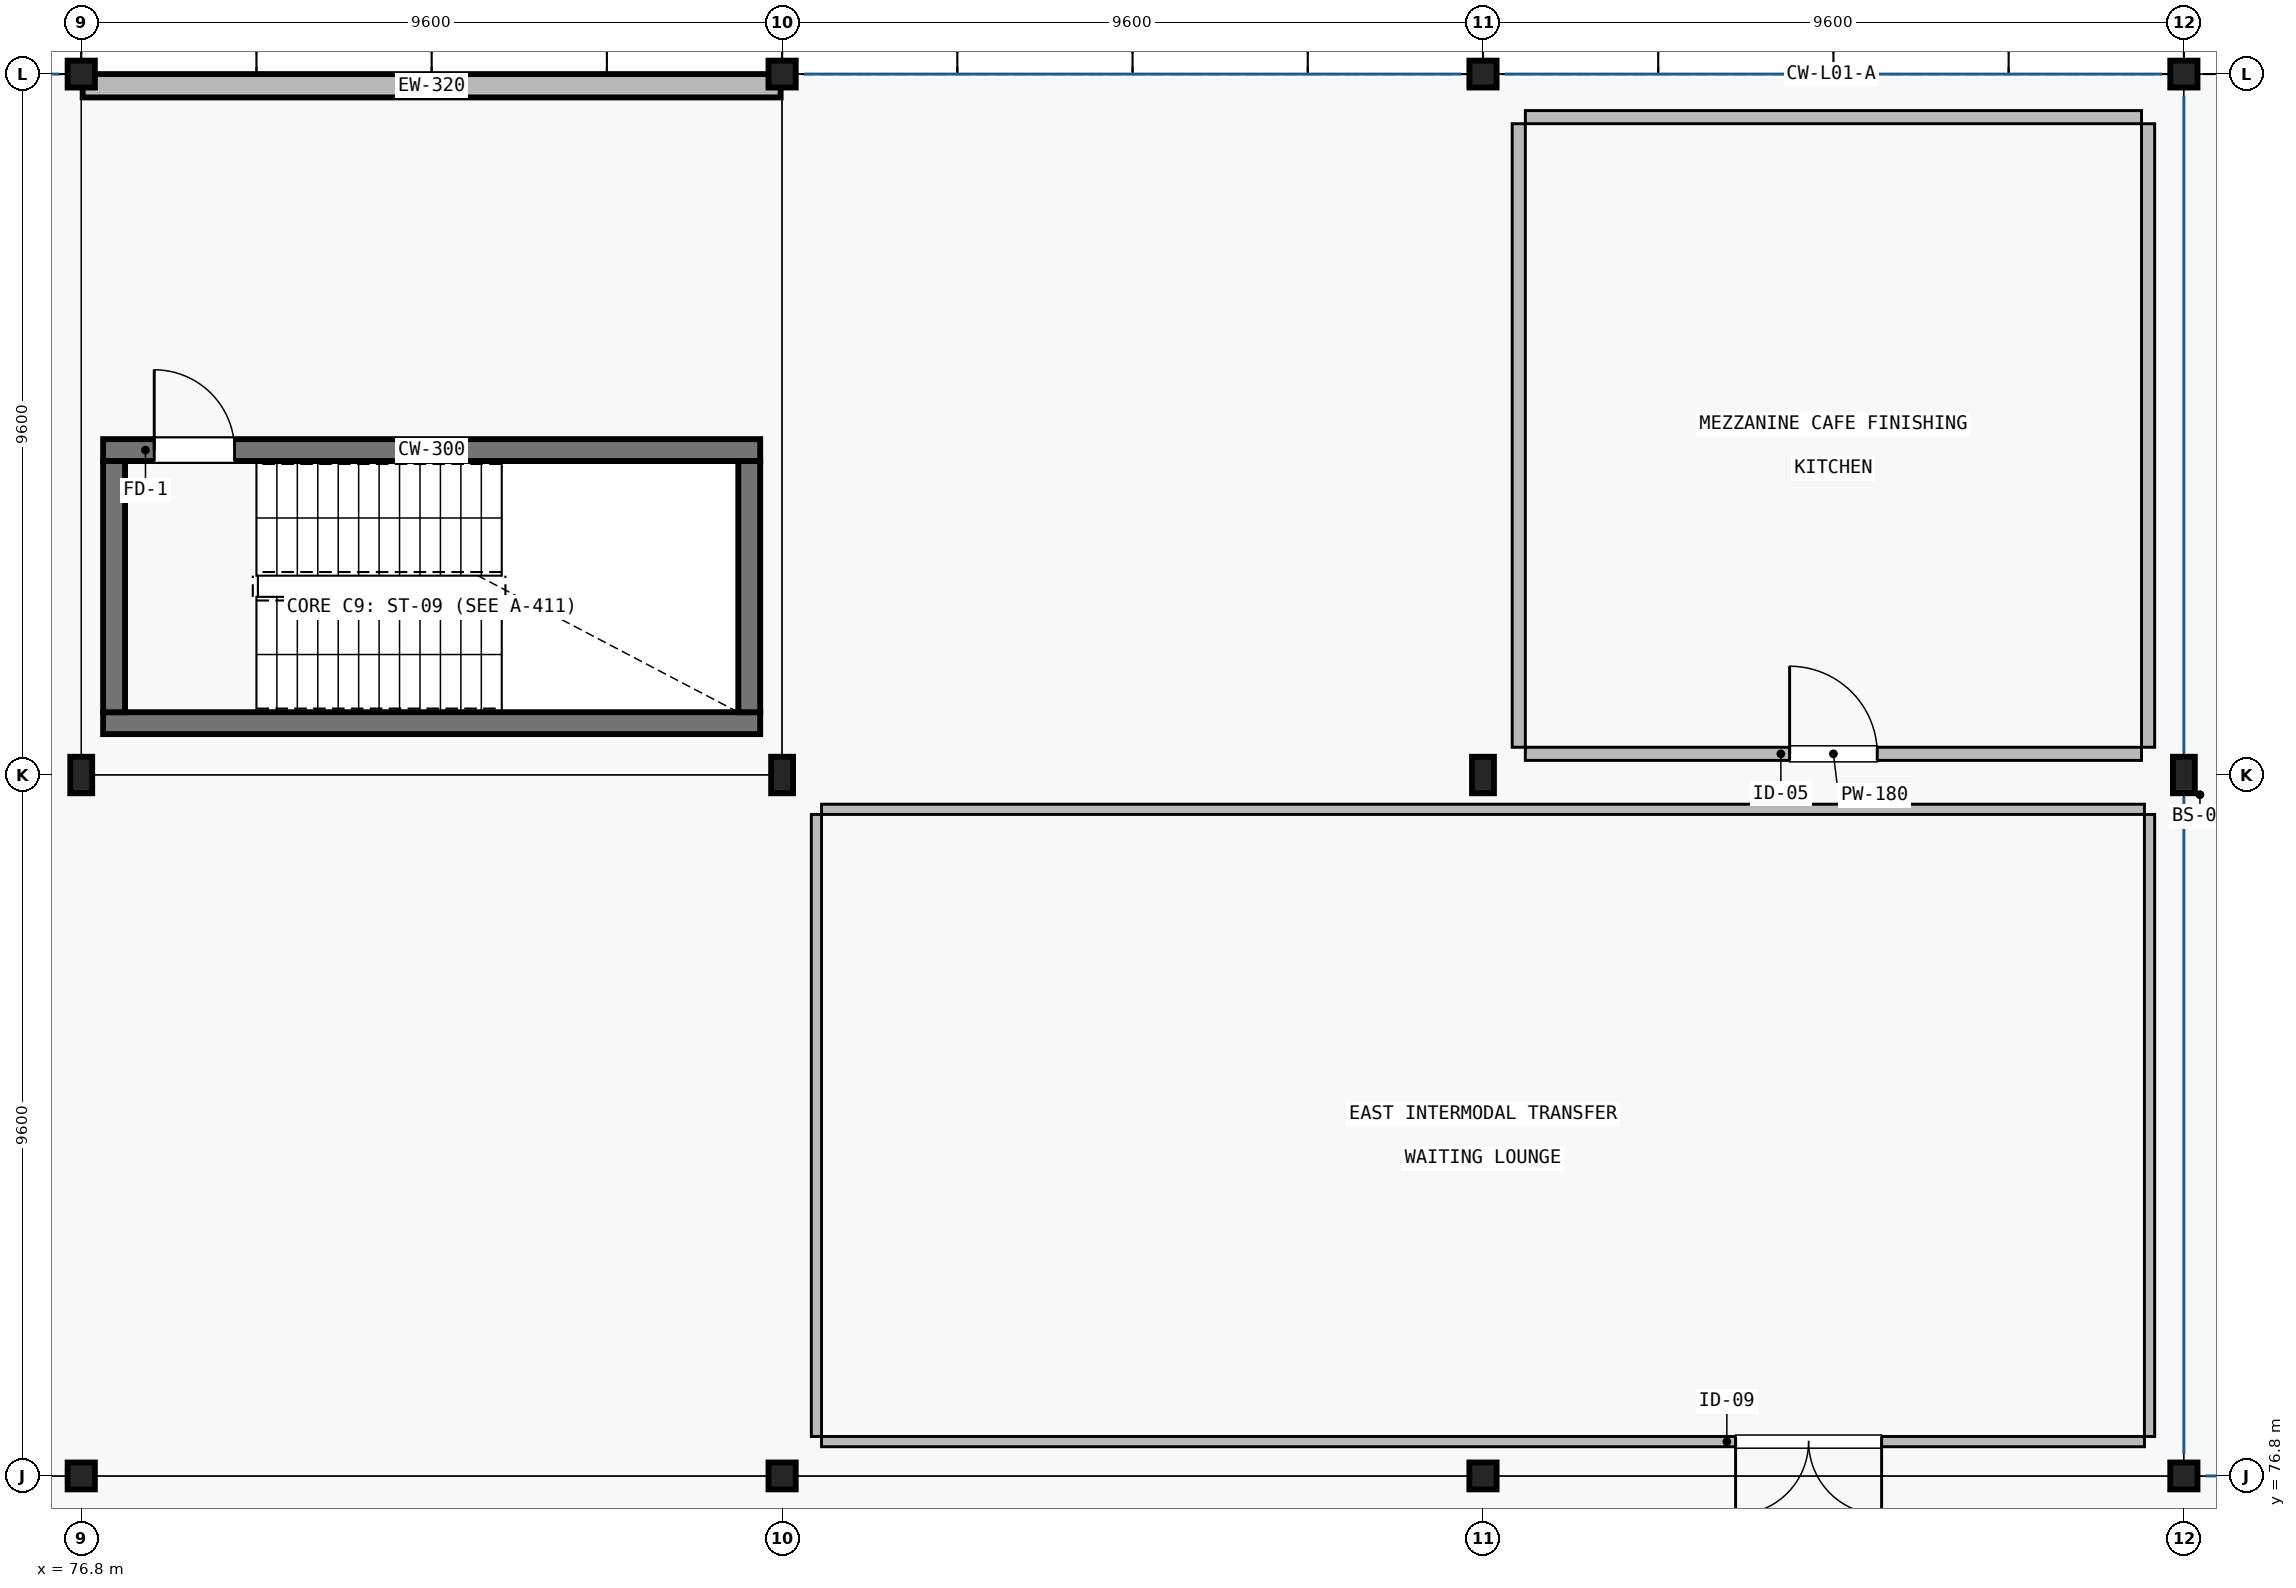
"""IFC4 building model, lengths in metres.
Left out: names, types, materials, properties, quantities, classifications, styles, units other than length and angle.
Written with IfcOpenShell. Run it as: python <this file> out.ifc"""

import sys

from ifc_helpers import new_model, si_unit, direction, frame, frame_2d, origin, origin_2d, place, context, subcontext, project, spatial, rectangle, i_section, extrude, element, fill, save


model = new_model("IFC4")
c1 = context("Model", 3, precision=1e-05, world=origin(), true_north=direction((0.0, 1.0)))
c2 = subcontext(c1, "Body", "Model", "MODEL_VIEW")
j1 = project(units=[si_unit("LENGTHUNIT", "METRE"), si_unit("PLANEANGLEUNIT", "RADIAN")], contexts=[c1])
p1 = place(None, origin())
s1 = spatial("IfcSite", under=j1, at=p1, CompositionType="ELEMENT")
p2 = place(p1, origin())
s2 = spatial("IfcBuilding", under=s1, at=p2, CompositionType="ELEMENT")
p3 = place(p2, frame((0.0, 0.0, 6.0)))
s3 = spatial("IfcBuildingStorey", under=s2, at=p3, CompositionType="ELEMENT", Elevation=6.0)
p4 = place(p3, frame((76.8, 76.8, 0.0), z_axis=(0.0, 0.0, 1.0), x_axis=(1.0, 0.0, 0.0)))
e1 = element("IfcColumn", 1, at=p4, inside=s3, PredefinedType="COLUMN", context=c2, shape_type="SweptSolid", body=[
    extrude(i_section(OverallWidth=0.373, OverallDepth=0.368, WebThickness=0.014, FlangeThickness=0.024, FilletRadius=0.015, at=origin_2d()), origin(), (0.0, 0.0, 1.0), 4.25),
])
p5 = place(p3, frame((76.8, 86.4, 0.0), z_axis=(0.0, 0.0, 1.0), x_axis=(1.0, 0.0, 0.0)))
e2 = element("IfcColumn", 2, at=p5, inside=s3, PredefinedType="COLUMN", context=c2, shape_type="SweptSolid", body=[
    extrude(i_section(OverallWidth=0.3, OverallDepth=0.5, WebThickness=0.014, FlangeThickness=0.028, FilletRadius=0.027, at=origin_2d()), origin(), (0.0, 0.0, 1.0), 4.25),
])
for number, where, z_axis, x_axis in (
    (3, (76.8, 96.0, 0.0), (0.0, 0.0, 1.0), (1.0, 0.0, 0.0)),
    (4, (86.4, 76.8, 0.0), (0.0, 0.0, 1.0), (1.0, 0.0, 0.0)),
):
    element("IfcColumn", number, at=place(p3, frame(where, z_axis=z_axis, x_axis=x_axis)), inside=s3, PredefinedType="COLUMN", context=c2, shape_type="SweptSolid", body=[
        extrude(i_section(OverallWidth=0.373, OverallDepth=0.368, WebThickness=0.014, FlangeThickness=0.024, FilletRadius=0.015, at=origin_2d()), origin(), (0.0, 0.0, 1.0), 4.25),
    ])
p6 = place(p3, frame((86.4, 86.4, 0.0), z_axis=(0.0, 0.0, 1.0), x_axis=(1.0, 0.0, 0.0)))
e5 = element("IfcColumn", 5, at=p6, inside=s3, PredefinedType="COLUMN", context=c2, shape_type="SweptSolid", body=[
    extrude(i_section(OverallWidth=0.3, OverallDepth=0.5, WebThickness=0.014, FlangeThickness=0.028, FilletRadius=0.027, at=origin_2d()), origin(), (0.0, 0.0, 1.0), 4.25),
])
for number, where, z_axis, x_axis in (
    (6, (86.4, 96.0, 0.0), (0.0, 0.0, 1.0), (1.0, 0.0, 0.0)),
    (7, (96.0, 76.8, 0.0), (0.0, 0.0, 1.0), (1.0, 0.0, 0.0)),
):
    element("IfcColumn", number, at=place(p3, frame(where, z_axis=z_axis, x_axis=x_axis)), inside=s3, PredefinedType="COLUMN", context=c2, shape_type="SweptSolid", body=[
        extrude(i_section(OverallWidth=0.373, OverallDepth=0.368, WebThickness=0.014, FlangeThickness=0.024, FilletRadius=0.015, at=origin_2d()), origin(), (0.0, 0.0, 1.0), 4.25),
    ])
p7 = place(p3, frame((96.0, 86.4, 0.0), z_axis=(0.0, 0.0, 1.0), x_axis=(1.0, 0.0, 0.0)))
e8 = element("IfcColumn", 8, at=p7, inside=s3, PredefinedType="COLUMN", context=c2, shape_type="SweptSolid", body=[
    extrude(i_section(OverallWidth=0.3, OverallDepth=0.5, WebThickness=0.014, FlangeThickness=0.028, FilletRadius=0.027, at=origin_2d()), origin(), (0.0, 0.0, 1.0), 4.25),
])
p8 = place(p3, frame((96.0, 96.0, 0.0), z_axis=(0.0, 0.0, 1.0), x_axis=(1.0, 0.0, 0.0)))
e9 = element("IfcColumn", 9, at=p8, inside=s3, PredefinedType="COLUMN", context=c2, shape_type="SweptSolid", body=[
    extrude(i_section(OverallWidth=0.373, OverallDepth=0.368, WebThickness=0.014, FlangeThickness=0.024, FilletRadius=0.015, at=origin_2d()), origin(), (0.0, 0.0, 1.0), 4.25),
])
p9 = place(p3, frame((105.6, 76.8, 0.0), z_axis=(0.0, 0.0, 1.0), x_axis=(1.0, 0.0, 0.0)))
e10 = element("IfcColumn", 10, at=p9, inside=s3, PredefinedType="COLUMN", context=c2, shape_type="SweptSolid", body=[
    extrude(i_section(OverallWidth=0.373, OverallDepth=0.368, WebThickness=0.014, FlangeThickness=0.024, FilletRadius=0.015, at=origin_2d()), origin(), (0.0, 0.0, 1.0), 4.55),
])
p10 = place(p3, frame((105.6, 86.4, 0.0), z_axis=(0.0, 0.0, 1.0), x_axis=(1.0, 0.0, 0.0)))
e11 = element("IfcColumn", 11, at=p10, inside=s3, PredefinedType="COLUMN", context=c2, shape_type="SweptSolid", body=[
    extrude(i_section(OverallWidth=0.3, OverallDepth=0.5, WebThickness=0.014, FlangeThickness=0.028, FilletRadius=0.027, at=origin_2d()), origin(), (0.0, 0.0, 1.0), 4.25),
])
p11 = place(p3, frame((105.6, 96.0, 0.0), z_axis=(0.0, 0.0, 1.0), x_axis=(1.0, 0.0, 0.0)))
e12 = element("IfcColumn", 12, at=p11, inside=s3, PredefinedType="COLUMN", context=c2, shape_type="SweptSolid", body=[
    extrude(i_section(OverallWidth=0.373, OverallDepth=0.368, WebThickness=0.014, FlangeThickness=0.024, FilletRadius=0.015, at=origin_2d()), origin(), (0.0, 0.0, 1.0), 4.25),
])
p12 = place(p3, frame((77.1, 87.11, 0.0), z_axis=(0.0, 0.0, 1.0), x_axis=(1.0, 0.0, 0.0)))
e13 = element("IfcWall", 13, at=p12, inside=s3, PredefinedType="SHEAR", context=c2, shape_type="SweptSolid", body=[
    extrude(rectangle(XDim=9.0, YDim=0.3, at=frame_2d((4.5, 0.0))), origin(), (0.0, 0.0, 1.0), 4.25),
])
p13 = place(p3, frame((86.1, 90.85, 0.0), z_axis=(0.0, 0.0, 1.0), x_axis=(-1.0, 0.0, 0.0)))
e14 = element("IfcWall", 14, at=p13, inside=s3, PredefinedType="SHEAR", context=c2, shape_type="SweptSolid", body=[
    extrude(rectangle(XDim=9.0, YDim=0.3, at=frame_2d((4.5, 0.0))), origin(), (0.0, 0.0, 1.0), 4.25),
])
p14 = place(p13, frame((7.2, 0.0, 0.0)))
e15 = element("IfcOpeningElement", 15, at=p14, cuts=e14, PredefinedType="OPENING", context=c2, shape_type="SweptSolid", body=[
    extrude(rectangle(XDim=1.1, YDim=2.15, at=frame_2d((0.55, 1.075))), frame((0.0, 0.16, 0.0), z_axis=(0.0, -1.0, 0.0), x_axis=(1.0, 0.0, 0.0)), (0.0, 0.0, 1.0), 0.32),
])
for number, where, z_axis, x_axis in (
    (16, (77.25, 87.26, 0.0), (0.0, 0.0, 1.0), (0.0, 1.0, 0.0)),
    (17, (85.95, 90.7, 0.0), (0.0, 0.0, 1.0), (0.0, -1.0, 0.0)),
):
    element("IfcWall", number, at=place(p3, frame(where, z_axis=z_axis, x_axis=x_axis)), inside=s3, PredefinedType="SHEAR", context=c2, shape_type="SweptSolid", body=[
        extrude(rectangle(XDim=3.44, YDim=0.3, at=frame_2d((1.72, 0.0))), origin(), (0.0, 0.0, 1.0), 4.25),
    ])
p15 = place(p3, frame((76.82, 95.84, 0.0), z_axis=(0.0, 0.0, 1.0), x_axis=(1.0, 0.0, 0.0)))
e18 = element("IfcWall", 18, at=p15, inside=s3, PredefinedType="SOLIDWALL", context=c2, shape_type="SweptSolid", body=[
    extrude(rectangle(XDim=9.56, YDim=0.32, at=frame_2d((4.78, 0.0))), origin(), (0.0, 0.0, 1.0), 3.9),
])
p16 = place(p3, frame((105.06, 77.27, 0.0), z_axis=(0.0, 0.0, 1.0), x_axis=(-1.0, 0.0, 0.0)))
e19 = element("IfcWall", 19, at=p16, inside=s3, PredefinedType="PARTITIONING", context=c2, shape_type="SweptSolid", body=[
    extrude(rectangle(XDim=18.12, YDim=0.14, at=frame_2d((9.06, 0.0))), origin(), (0.0, 0.0, 1.0), 3.707),
])
p17 = place(p16, frame((3.6, 0.0, 0.0)))
e20 = element("IfcOpeningElement", 20, at=p17, cuts=e19, PredefinedType="OPENING", context=c2, shape_type="SweptSolid", body=[
    extrude(rectangle(XDim=2.0, YDim=2.4, at=frame_2d((1.0, 1.2))), frame((0.0, 0.08, 0.0), z_axis=(0.0, -1.0, 0.0), x_axis=(1.0, 0.0, 0.0)), (0.0, 0.0, 1.0), 0.16),
])
p18 = place(p3, frame((86.94, 85.93, 0.0), z_axis=(0.0, 0.0, 1.0), x_axis=(1.0, 0.0, 0.0)))
e21 = element("IfcWall", 21, at=p18, inside=s3, PredefinedType="PARTITIONING", context=c2, shape_type="SweptSolid", body=[
    extrude(rectangle(XDim=18.12, YDim=0.14, at=frame_2d((9.06, 0.0))), origin(), (0.0, 0.0, 1.0), 3.707),
])
for number, where, z_axis, x_axis in (
    (22, (86.87, 77.34, 0.0), (0.0, 0.0, 1.0), (0.0, 1.0, 0.0)),
    (23, (105.13, 85.86, 0.0), (0.0, 0.0, 1.0), (0.0, -1.0, 0.0)),
):
    element("IfcWall", number, at=place(p3, frame(where, z_axis=z_axis, x_axis=x_axis)), inside=s3, PredefinedType="PARTITIONING", context=c2, shape_type="SweptSolid", body=[
        extrude(rectangle(XDim=8.52, YDim=0.14, at=frame_2d((4.26, 0.0))), origin(), (0.0, 0.0, 1.0), 3.89),
    ])
p19 = place(p3, frame((105.02, 86.69, 0.0), z_axis=(0.0, 0.0, 1.0), x_axis=(-1.0, 0.0, 0.0)))
e24 = element("IfcWall", 24, at=p19, inside=s3, PredefinedType="PARTITIONING", context=c2, shape_type="SweptSolid", body=[
    extrude(rectangle(XDim=8.44, YDim=0.18, at=frame_2d((4.22, 0.0))), origin(), (0.0, 0.0, 1.0), 3.89),
])
p20 = place(p19, frame((3.62, 0.0, 0.0)))
e25 = element("IfcOpeningElement", 25, at=p20, cuts=e24, PredefinedType="OPENING", context=c2, shape_type="SweptSolid", body=[
    extrude(rectangle(XDim=1.2, YDim=2.2, at=frame_2d((0.6, 1.1))), frame((0.0, 0.1, 0.0), z_axis=(0.0, -1.0, 0.0), x_axis=(1.0, 0.0, 0.0)), (0.0, 0.0, 1.0), 0.2),
])
p21 = place(p3, frame((96.58, 95.41, 0.0), z_axis=(0.0, 0.0, 1.0), x_axis=(1.0, 0.0, 0.0)))
e26 = element("IfcWall", 26, at=p21, inside=s3, PredefinedType="PARTITIONING", context=c2, shape_type="SweptSolid", body=[
    extrude(rectangle(XDim=8.44, YDim=0.18, at=frame_2d((4.22, 0.0))), origin(), (0.0, 0.0, 1.0), 3.89),
])
for number, where, z_axis, x_axis in (
    (27, (96.49, 86.78, 0.0), (0.0, 0.0, 1.0), (0.0, 1.0, 0.0)),
    (28, (105.11, 95.32, 0.0), (0.0, 0.0, 1.0), (0.0, -1.0, 0.0)),
):
    element("IfcWall", number, at=place(p3, frame(where, z_axis=z_axis, x_axis=x_axis)), inside=s3, PredefinedType="PARTITIONING", context=c2, shape_type="SweptSolid", body=[
        extrude(rectangle(XDim=8.54, YDim=0.18, at=frame_2d((4.27, 0.0))), origin(), (0.0, 0.0, 1.0), 3.89),
    ])
p22 = place(p14, frame((1.1, 0.0, 0.0), z_axis=(0.0, 0.0, 1.0), x_axis=(-1.0, 0.0, 0.0)))
e29 = element("IfcDoor", 29, at=p22, inside=s3, OperationType="SINGLE_SWING_RIGHT", PredefinedType="DOOR", context=c2, shape_type="SweptSolid", body=[
    extrude(rectangle(XDim=1.1, YDim=2.15, at=frame_2d((0.55, 1.075))), frame((0.0, 0.025, 0.0), z_axis=(0.0, -1.0, 0.0), x_axis=(1.0, 0.0, 0.0)), (0.0, 0.0, 1.0), 0.05),
])
fill(e15, e29)
p23 = place(p17, origin())
e30 = element("IfcDoor", 30, at=p23, inside=s3, OperationType="DOUBLE_DOOR_SINGLE_SWING", PredefinedType="DOOR", context=c2, shape_type="SweptSolid", body=[
    extrude(rectangle(XDim=2.0, YDim=2.4, at=frame_2d((1.0, 1.2))), frame((0.0, 0.025, 0.0), z_axis=(0.0, -1.0, 0.0), x_axis=(1.0, 0.0, 0.0)), (0.0, 0.0, 1.0), 0.05),
])
fill(e20, e30)
p24 = place(p20, frame((1.2, 0.0, 0.0), z_axis=(0.0, 0.0, 1.0), x_axis=(-1.0, 0.0, 0.0)))
e31 = element("IfcDoor", 31, at=p24, inside=s3, OperationType="SINGLE_SWING_RIGHT", PredefinedType="DOOR", context=c2, shape_type="SweptSolid", body=[
    extrude(rectangle(XDim=1.2, YDim=2.2, at=frame_2d((0.6, 1.1))), frame((0.0, 0.025, 0.0), z_axis=(0.0, -1.0, 0.0), x_axis=(1.0, 0.0, 0.0)), (0.0, 0.0, 1.0), 0.05),
])
fill(e25, e31)
save(model, sys.argv[1])
